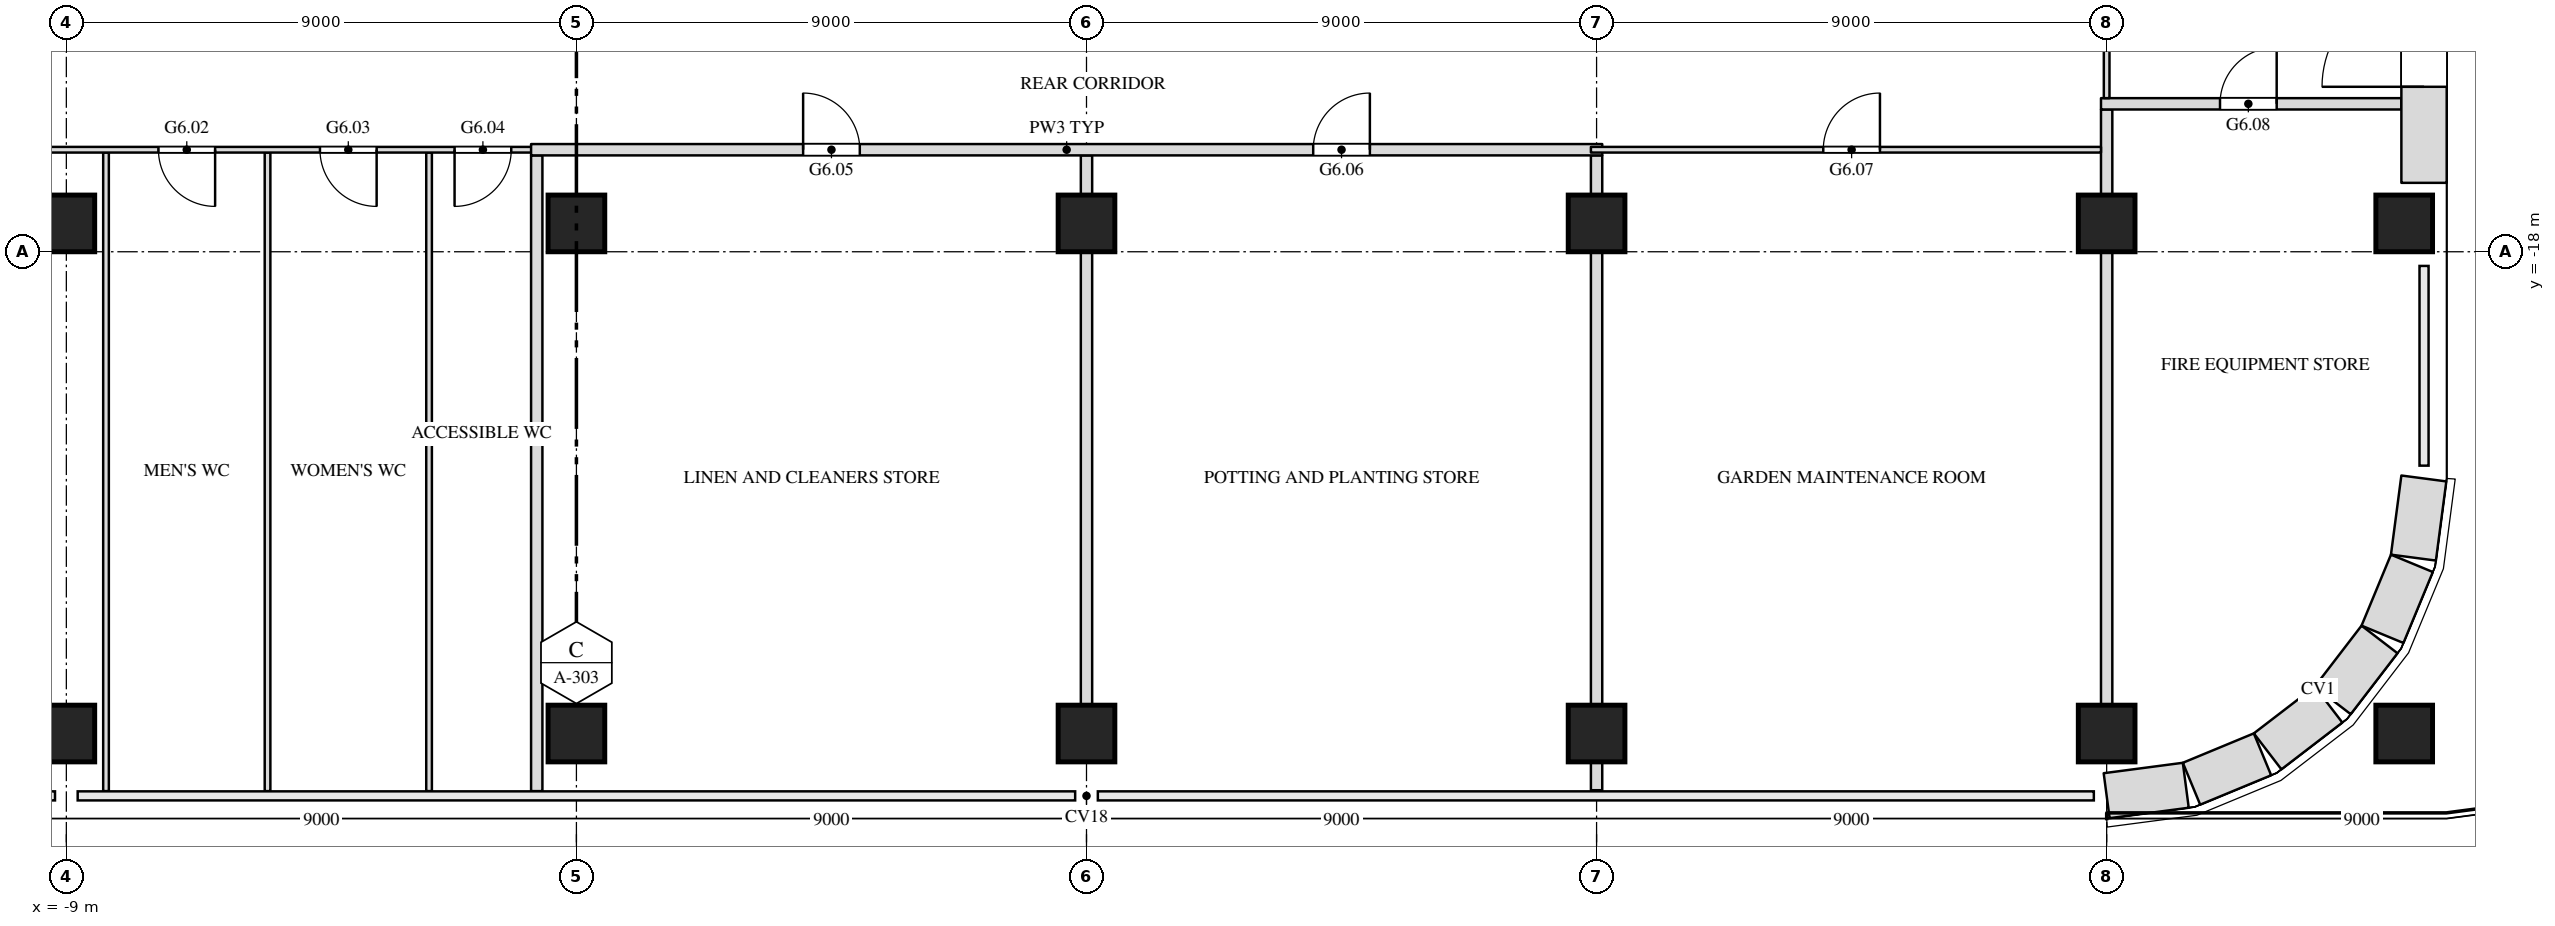
"""IFC4 building model, lengths in metres.
Left out: names, types, materials, properties, quantities, classifications, styles, units other than length and angle.
Written with IfcOpenShell. Run it as: python <this file> out.ifc"""

import sys

from ifc_helpers import new_model, si_unit, direction, frame, frame_2d, origin, origin_2d, place, context, subcontext, project, spatial, rectangle, extrude, element, fill, save


model = new_model("IFC4")
c1 = context("Model", 3, precision=1e-05, world=origin(), true_north=direction((0.0, 1.0)))
c2 = subcontext(c1, "Body", "Model", "MODEL_VIEW")
j1 = project(units=[si_unit("LENGTHUNIT", "METRE"), si_unit("PLANEANGLEUNIT", "RADIAN")], contexts=[c1])
p1 = place(None, origin())
s1 = spatial("IfcSite", under=j1, at=p1, CompositionType="ELEMENT")
p2 = place(p1, origin())
s2 = spatial("IfcBuilding", under=s1, at=p2, CompositionType="ELEMENT")
p3 = place(p2, frame((0.0, 0.0, 39.0)))
s3 = spatial("IfcBuildingStorey", under=s2, at=p3, CompositionType="ELEMENT", Elevation=39.0)
for number, where, z_axis, x_axis in (
    (1, (-9.0, -26.5, 0.0), (0.0, 0.0, 1.0), (1.0, 0.0, 0.0)),
    (2, (0.0, -26.5, 0.0), (0.0, 0.0, 1.0), (1.0, 0.0, 0.0)),
    (3, (9.0, -26.5, 0.0), (0.0, 0.0, 1.0), (1.0, 0.0, 0.0)),
    (4, (18.0, -26.5, 0.0), (0.0, 0.0, 1.0), (1.0, 0.0, 0.0)),
    (5, (27.0, -26.5, 0.0), (0.0, 0.0, 1.0), (1.0, 0.0, 0.0)),
    (6, (32.25, -26.5, 0.0), (0.0, 0.0, 1.0), (1.0, 0.0, 0.0)),
    (7, (-9.0, -17.5, 0.0), (0.0, 0.0, 1.0), (1.0, 0.0, 0.0)),
    (8, (0.0, -17.5, 0.0), (0.0, 0.0, 1.0), (1.0, 0.0, 0.0)),
    (9, (9.0, -17.5, 0.0), (0.0, 0.0, 1.0), (1.0, 0.0, 0.0)),
    (10, (18.0, -17.5, 0.0), (0.0, 0.0, 1.0), (1.0, 0.0, 0.0)),
    (11, (27.0, -17.5, 0.0), (0.0, 0.0, 1.0), (1.0, 0.0, 0.0)),
    (12, (32.25, -17.5, 0.0), (0.0, 0.0, 1.0), (1.0, 0.0, 0.0)),
):
    element("IfcColumn", number, at=place(p3, frame(where, z_axis=z_axis, x_axis=x_axis)), inside=s3, PredefinedType="COLUMN", context=c2, shape_type="SweptSolid", body=[
        extrude(rectangle(XDim=1.0, YDim=1.0, at=origin_2d()), origin(), (0.0, 0.0, 1.0), 4.5),
    ])
for number, where, z_axis, x_axis in (
    (13, (-8.3, -27.516, 0.0), (0.0, 0.0, 1.0), (0.0, 1.0, 0.0)),
    (14, (-5.45, -27.516, 0.0), (0.0, 0.0, 1.0), (0.0, 1.0, 0.0)),
    (15, (-2.6, -27.516, 0.0), (0.0, 0.0, 1.0), (0.0, 1.0, 0.0)),
):
    element("IfcWall", number, at=place(p3, frame(where, z_axis=z_axis, x_axis=x_axis)), inside=s3, PredefinedType="PARTITIONING", context=c2, shape_type="SweptSolid", body=[
        extrude(rectangle(XDim=11.266, YDim=0.1, at=frame_2d((5.633, 0.0))), origin(), (0.0, 0.0, 1.0), 4.25),
    ])
p4 = place(p3, frame((-0.7, -27.516, 0.0), z_axis=(0.0, 0.0, 1.0), x_axis=(0.0, 1.0, 0.0)))
e16 = element("IfcWall", 16, at=p4, inside=s3, PredefinedType="PARTITIONING", context=c2, shape_type="SweptSolid", body=[
    extrude(rectangle(XDim=11.216, YDim=0.2, at=frame_2d((5.608, 0.0))), origin(), (0.0, 0.0, 1.0), 4.25),
])
p5 = place(p3, frame((18.0, -27.5, 0.0), z_axis=(0.0, 0.0, 1.0), x_axis=(0.0, 1.0, 0.0)))
e17 = element("IfcWall", 17, at=p5, inside=s3, PredefinedType="PARTITIONING", context=c2, shape_type="SweptSolid", body=[
    extrude(rectangle(XDim=0.5, YDim=0.2, at=frame_2d((0.25, 0.0))), origin(), (0.0, 0.0, 1.0), 4.25),
])
p6 = place(p3, frame((18.0, -26.0, 0.0), z_axis=(0.0, 0.0, 1.0), x_axis=(0.0, 1.0, 0.0)))
e18 = element("IfcWall", 18, at=p6, inside=s3, PredefinedType="PARTITIONING", context=c2, shape_type="SweptSolid", body=[
    extrude(rectangle(XDim=8.0, YDim=0.2, at=frame_2d((4.0, 0.0))), origin(), (0.0, 0.0, 1.0), 3.638),
])
p7 = place(p3, frame((18.0, -17.0, 0.0), z_axis=(0.0, 0.0, 1.0), x_axis=(0.0, 1.0, 0.0)))
e19 = element("IfcWall", 19, at=p7, inside=s3, PredefinedType="PARTITIONING", context=c2, shape_type="SweptSolid", body=[
    extrude(rectangle(XDim=0.7, YDim=0.2, at=frame_2d((0.35, 0.0))), origin(), (0.0, 0.0, 1.0), 4.25),
])
p8 = place(p3, frame((9.0, -26.0, 0.0), z_axis=(0.0, 0.0, 1.0), x_axis=(0.0, 1.0, 0.0)))
e20 = element("IfcWall", 20, at=p8, inside=s3, PredefinedType="PARTITIONING", context=c2, shape_type="SweptSolid", body=[
    extrude(rectangle(XDim=8.0, YDim=0.2, at=frame_2d((4.0, 0.0))), origin(), (0.0, 0.0, 1.0), 3.638),
])
p9 = place(p3, frame((9.0, -17.0, 0.0), z_axis=(0.0, 0.0, 1.0), x_axis=(0.0, 1.0, 0.0)))
e21 = element("IfcWall", 21, at=p9, inside=s3, PredefinedType="PARTITIONING", context=c2, shape_type="SweptSolid", body=[
    extrude(rectangle(XDim=0.7, YDim=0.2, at=frame_2d((0.35, 0.0))), origin(), (0.0, 0.0, 1.0), 4.25),
])
p10 = place(p3, frame((27.0, -26.0, 0.0), z_axis=(0.0, 0.0, 1.0), x_axis=(0.0, 1.0, 0.0)))
e22 = element("IfcWall", 22, at=p10, inside=s3, PredefinedType="PARTITIONING", context=c2, shape_type="SweptSolid", body=[
    extrude(rectangle(XDim=8.0, YDim=0.2, at=frame_2d((4.0, 0.0))), origin(), (0.0, 0.0, 1.0), 3.638),
])
p11 = place(p3, frame((27.0, -17.0, 0.0), z_axis=(0.0, 0.0, 1.0), x_axis=(0.0, 1.0, 0.0)))
e23 = element("IfcWall", 23, at=p11, inside=s3, PredefinedType="PARTITIONING", context=c2, shape_type="SweptSolid", body=[
    extrude(rectangle(XDim=1.51, YDim=0.2, at=frame_2d((0.755, 0.0))), origin(), (0.0, 0.0, 1.0), 3.638),
])
p12 = place(p3, frame((-26.9, -16.2, 0.0), z_axis=(0.0, 0.0, 1.0), x_axis=(1.0, 0.0, 0.0)))
e24 = element("IfcWall", 24, at=p12, inside=s3, PredefinedType="PARTITIONING", context=c2, shape_type="SweptSolid", body=[
    extrude(rectangle(XDim=26.3, YDim=0.1, at=frame_2d((13.15, 0.0))), origin(), (0.0, 0.0, 1.0), 4.25),
])
p13 = place(p12, frame((3.9, 0.0, 0.0)))
e25 = element("IfcOpeningElement", 25, at=p13, cuts=e24, PredefinedType="OPENING", context=c2, shape_type="SweptSolid", body=[
    extrude(rectangle(XDim=1.0, YDim=2.1, at=frame_2d((0.5, 1.05))), frame((0.0, 0.062, 0.0), z_axis=(0.0, -1.0, 0.0), x_axis=(1.0, 0.0, 0.0)), (0.0, 0.0, 1.0), 0.124),
])
p14 = place(p12, frame((19.525, 0.0, 0.0)))
e26 = element("IfcOpeningElement", 26, at=p14, cuts=e24, PredefinedType="OPENING", context=c2, shape_type="SweptSolid", body=[
    extrude(rectangle(XDim=1.0, YDim=2.1, at=frame_2d((0.5, 1.05))), frame((0.0, 0.062, 0.0), z_axis=(0.0, -1.0, 0.0), x_axis=(1.0, 0.0, 0.0)), (0.0, 0.0, 1.0), 0.124),
])
p15 = place(p12, frame((22.375, 0.0, 0.0)))
e27 = element("IfcOpeningElement", 27, at=p15, cuts=e24, PredefinedType="OPENING", context=c2, shape_type="SweptSolid", body=[
    extrude(rectangle(XDim=1.0, YDim=2.1, at=frame_2d((0.5, 1.05))), frame((0.0, 0.062, 0.0), z_axis=(0.0, -1.0, 0.0), x_axis=(1.0, 0.0, 0.0)), (0.0, 0.0, 1.0), 0.124),
])
p16 = place(p12, frame((24.75, 0.0, 0.0)))
e28 = element("IfcOpeningElement", 28, at=p16, cuts=e24, PredefinedType="OPENING", context=c2, shape_type="SweptSolid", body=[
    extrude(rectangle(XDim=1.0, YDim=2.1, at=frame_2d((0.5, 1.05))), frame((0.0, 0.062, 0.0), z_axis=(0.0, -1.0, 0.0), x_axis=(1.0, 0.0, 0.0)), (0.0, 0.0, 1.0), 0.124),
])
p17 = place(p3, frame((-0.8, -16.2, 0.0), z_axis=(0.0, 0.0, 1.0), x_axis=(1.0, 0.0, 0.0)))
e29 = element("IfcWall", 29, at=p17, inside=s3, PredefinedType="PARTITIONING", context=c2, shape_type="SweptSolid", body=[
    extrude(rectangle(XDim=18.9, YDim=0.2, at=frame_2d((9.45, 0.0))), origin(), (0.0, 0.0, 1.0), 4.25),
])
p18 = place(p17, frame((4.8, 0.0, 0.0)))
e30 = element("IfcOpeningElement", 30, at=p18, cuts=e29, PredefinedType="OPENING", context=c2, shape_type="SweptSolid", body=[
    extrude(rectangle(XDim=1.0, YDim=2.1, at=frame_2d((0.5, 1.05))), frame((0.0, 0.112, 0.0), z_axis=(0.0, -1.0, 0.0), x_axis=(1.0, 0.0, 0.0)), (0.0, 0.0, 1.0), 0.224),
])
p19 = place(p17, frame((13.8, 0.0, 0.0)))
e31 = element("IfcOpeningElement", 31, at=p19, cuts=e29, PredefinedType="OPENING", context=c2, shape_type="SweptSolid", body=[
    extrude(rectangle(XDim=1.0, YDim=2.1, at=frame_2d((0.5, 1.05))), frame((0.0, 0.112, 0.0), z_axis=(0.0, -1.0, 0.0), x_axis=(1.0, 0.0, 0.0)), (0.0, 0.0, 1.0), 0.224),
])
p20 = place(p3, frame((17.9, -16.2, 0.0), z_axis=(0.0, 0.0, 1.0), x_axis=(1.0, 0.0, 0.0)))
e32 = element("IfcWall", 32, at=p20, inside=s3, PredefinedType="PARTITIONING", context=c2, shape_type="SweptSolid", body=[
    extrude(rectangle(XDim=9.0, YDim=0.1, at=frame_2d((4.5, 0.0))), origin(), (0.0, 0.0, 1.0), 4.25),
])
p21 = place(p20, frame((4.1, 0.0, 0.0)))
e33 = element("IfcOpeningElement", 33, at=p21, cuts=e32, PredefinedType="OPENING", context=c2, shape_type="SweptSolid", body=[
    extrude(rectangle(XDim=1.0, YDim=2.1, at=frame_2d((0.5, 1.05))), frame((0.0, 0.062, 0.0), z_axis=(0.0, -1.0, 0.0), x_axis=(1.0, 0.0, 0.0)), (0.0, 0.0, 1.0), 0.124),
])
p22 = place(p3, frame((26.9, -15.39, 0.0), z_axis=(0.0, 0.0, 1.0), x_axis=(1.0, 0.0, 0.0)))
e34 = element("IfcWall", 34, at=p22, inside=s3, PredefinedType="PARTITIONING", context=c2, shape_type="SweptSolid", body=[
    extrude(rectangle(XDim=5.3, YDim=0.2, at=frame_2d((2.65, 0.0))), origin(), (0.0, 0.0, 1.0), 4.25),
])
p23 = place(p22, frame((2.1, 0.0, 0.0)))
e35 = element("IfcOpeningElement", 35, at=p23, cuts=e34, PredefinedType="OPENING", context=c2, shape_type="SweptSolid", body=[
    extrude(rectangle(XDim=1.0, YDim=2.1, at=frame_2d((0.5, 1.05))), frame((0.0, 0.112, 0.0), z_axis=(0.0, -1.0, 0.0), x_axis=(1.0, 0.0, 0.0)), (0.0, 0.0, 1.0), 0.224),
])
p24 = place(p3, frame((27.0, -15.29, 0.0), z_axis=(0.0, 0.0, 1.0), x_axis=(0.0, 1.0, 0.0)))
e36 = element("IfcWall", 36, at=p24, inside=s3, PredefinedType="PARTITIONING", context=c2, shape_type="SweptSolid", body=[
    extrude(rectangle(XDim=1.29, YDim=0.1, at=frame_2d((0.645, 0.0))), origin(), (0.0, 0.0, 1.0), 3.638),
])
p25 = place(p3, frame((27.0, -27.597, 0.0), z_axis=(0.0, 0.0, 1.0), x_axis=(0.99144603414, 0.130517283865, 0.0)))
e37 = element("IfcWall", 37, at=p25, inside=s3, PredefinedType="SOLIDWALL", context=c2, shape_type="SweptSolid", body=[
    extrude(rectangle(XDim=1.408, YDim=0.8, at=frame_2d((0.704, 0.0))), origin(), (0.0, 0.0, 1.0), 4.25),
])
p26 = place(p3, frame((28.497, -27.386, 0.0), z_axis=(0.0, 0.0, 1.0), x_axis=(0.923847774587, 0.38276009378, 0.0)))
e38 = element("IfcWall", 38, at=p26, inside=s3, PredefinedType="SOLIDWALL", context=c2, shape_type="SweptSolid", body=[
    extrude(rectangle(XDim=1.355, YDim=0.8, at=frame_2d((0.678, 0.0))), origin(), (0.0, 0.0, 1.0), 4.25),
])
for number, where, z_axis, x_axis in (
    (39, (29.84, -26.815, 0.0), (0.0, 0.0, 1.0), (0.793, 0.609, 0.0)),
    (40, (30.989, -25.916, 0.0), (0.0, 0.0, 1.0), (0.609, 0.793, 0.0)),
):
    element("IfcWall", number, at=place(p3, frame(where, z_axis=z_axis, x_axis=x_axis)), inside=s3, PredefinedType="SOLIDWALL", context=c2, shape_type="SweptSolid", body=[
        extrude(rectangle(XDim=1.356, YDim=0.8, at=frame_2d((0.678, 0.0))), origin(), (0.0, 0.0, 1.0), 4.25),
    ])
p27 = place(p3, frame((31.867, -24.75, 0.0), z_axis=(0.0, 0.0, 1.0), x_axis=(0.38276009378, 0.923847774587, 0.0)))
e41 = element("IfcWall", 41, at=p27, inside=s3, PredefinedType="SOLIDWALL", context=c2, shape_type="SweptSolid", body=[
    extrude(rectangle(XDim=1.355, YDim=0.8, at=frame_2d((0.678, 0.0))), origin(), (0.0, 0.0, 1.0), 4.25),
])
p28 = place(p3, frame((32.413, -23.396, 0.0), z_axis=(0.0, 0.0, 1.0), x_axis=(0.130517283865, 0.99144603414, 0.0)))
e42 = element("IfcWall", 42, at=p28, inside=s3, PredefinedType="SOLIDWALL", context=c2, shape_type="SweptSolid", body=[
    extrude(rectangle(XDim=1.408, YDim=0.8, at=frame_2d((0.704, 0.0))), origin(), (0.0, 0.0, 1.0), 4.25),
])
p29 = place(p3, frame((32.6, -16.784, 0.0), z_axis=(0.0, 0.0, 1.0), x_axis=(0.0, 1.0, 0.0)))
e43 = element("IfcWall", 43, at=p29, inside=s3, PredefinedType="SOLIDWALL", context=c2, shape_type="SweptSolid", body=[
    extrude(rectangle(XDim=4.734, YDim=0.8, at=frame_2d((2.367, 0.0))), origin(), (0.0, 0.0, 1.0), 4.25),
])
p30 = place(p29, frame((1.695, 0.0, 0.0)))
e44 = element("IfcOpeningElement", 44, at=p30, cuts=e43, PredefinedType="OPENING", context=c2, shape_type="SweptSolid", body=[
    extrude(rectangle(XDim=1.8, YDim=2.4, at=frame_2d((0.9, 1.2))), frame((0.0, 0.412, 0.0), z_axis=(0.0, -1.0, 0.0), x_axis=(1.0, 0.0, 0.0)), (0.0, 0.0, 1.0), 0.824),
])
p31 = place(p14, origin())
e45 = element("IfcDoor", 45, at=p31, inside=s3, OperationType="SINGLE_SWING_LEFT", PredefinedType="DOOR", context=c2, shape_type="SweptSolid", body=[
    extrude(rectangle(XDim=1.0, YDim=2.1, at=frame_2d((0.5, 1.05))), frame((0.0, 0.025, 0.0), z_axis=(0.0, -1.0, 0.0), x_axis=(1.0, 0.0, 0.0)), (0.0, 0.0, 1.0), 0.05),
])
fill(e26, e45)
p32 = place(p15, origin())
e46 = element("IfcDoor", 46, at=p32, inside=s3, OperationType="SINGLE_SWING_LEFT", PredefinedType="DOOR", context=c2, shape_type="SweptSolid", body=[
    extrude(rectangle(XDim=1.0, YDim=2.1, at=frame_2d((0.5, 1.05))), frame((0.0, 0.025, 0.0), z_axis=(0.0, -1.0, 0.0), x_axis=(1.0, 0.0, 0.0)), (0.0, 0.0, 1.0), 0.05),
])
fill(e27, e46)
p33 = place(p16, origin())
e47 = element("IfcDoor", 47, at=p33, inside=s3, OperationType="SINGLE_SWING_RIGHT", PredefinedType="DOOR", context=c2, shape_type="SweptSolid", body=[
    extrude(rectangle(XDim=1.0, YDim=2.1, at=frame_2d((0.5, 1.05))), frame((0.0, 0.025, 0.0), z_axis=(0.0, -1.0, 0.0), x_axis=(1.0, 0.0, 0.0)), (0.0, 0.0, 1.0), 0.05),
])
fill(e28, e47)
p34 = place(p18, origin())
e48 = element("IfcDoor", 48, at=p34, inside=s3, OperationType="SINGLE_SWING_LEFT", PredefinedType="DOOR", context=c2, shape_type="SweptSolid", body=[
    extrude(rectangle(XDim=1.0, YDim=2.1, at=frame_2d((0.5, 1.05))), frame((0.0, 0.025, 0.0), z_axis=(0.0, -1.0, 0.0), x_axis=(1.0, 0.0, 0.0)), (0.0, 0.0, 1.0), 0.05),
])
fill(e30, e48)
p35 = place(p19, origin())
e49 = element("IfcDoor", 49, at=p35, inside=s3, OperationType="SINGLE_SWING_RIGHT", PredefinedType="DOOR", context=c2, shape_type="SweptSolid", body=[
    extrude(rectangle(XDim=1.0, YDim=2.1, at=frame_2d((0.5, 1.05))), frame((0.0, 0.025, 0.0), z_axis=(0.0, -1.0, 0.0), x_axis=(1.0, 0.0, 0.0)), (0.0, 0.0, 1.0), 0.05),
])
fill(e31, e49)
p36 = place(p21, origin())
e50 = element("IfcDoor", 50, at=p36, inside=s3, OperationType="SINGLE_SWING_RIGHT", PredefinedType="DOOR", context=c2, shape_type="SweptSolid", body=[
    extrude(rectangle(XDim=1.0, YDim=2.1, at=frame_2d((0.5, 1.05))), frame((0.0, 0.025, 0.0), z_axis=(0.0, -1.0, 0.0), x_axis=(1.0, 0.0, 0.0)), (0.0, 0.0, 1.0), 0.05),
])
fill(e33, e50)
p37 = place(p23, origin())
e51 = element("IfcDoor", 51, at=p37, inside=s3, OperationType="SINGLE_SWING_RIGHT", PredefinedType="DOOR", context=c2, shape_type="SweptSolid", body=[
    extrude(rectangle(XDim=1.0, YDim=2.1, at=frame_2d((0.5, 1.05))), frame((0.0, 0.025, 0.0), z_axis=(0.0, -1.0, 0.0), x_axis=(1.0, 0.0, 0.0)), (0.0, 0.0, 1.0), 0.05),
])
fill(e35, e51)
p38 = place(p30, origin())
e52 = element("IfcDoor", 52, at=p38, inside=s3, OperationType="DOUBLE_DOOR_SINGLE_SWING", PredefinedType="DOOR", context=c2, shape_type="SweptSolid", body=[
    extrude(rectangle(XDim=1.8, YDim=2.4, at=frame_2d((0.9, 1.2))), frame((0.0, 0.025, 0.0), z_axis=(0.0, -1.0, 0.0), x_axis=(1.0, 0.0, 0.0)), (0.0, 0.0, 1.0), 0.05),
])
fill(e44, e52)
save(model, sys.argv[1])
